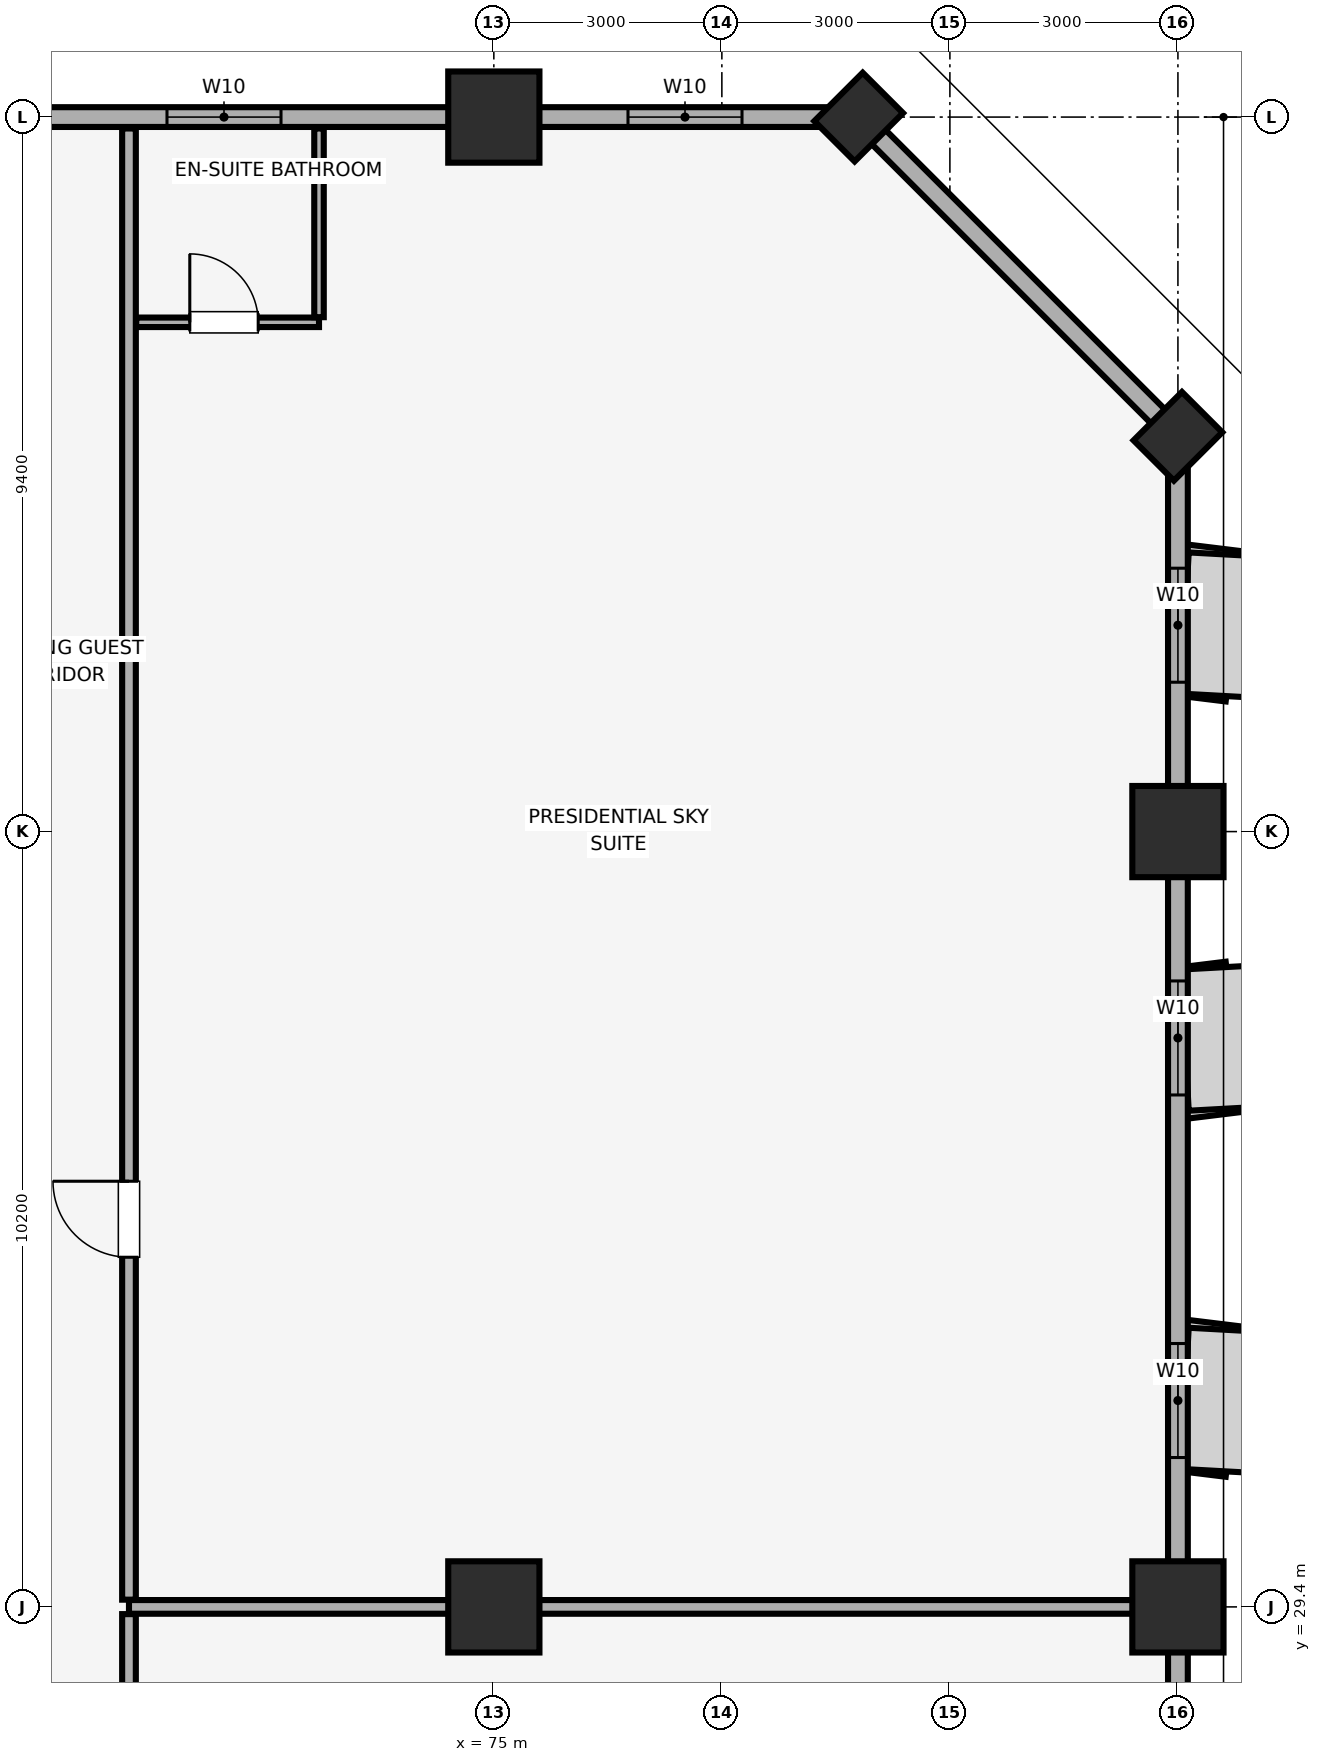
"""IFC4 building model, lengths in metres.
Left out: names, types, materials, properties, quantities, classifications, styles, units other than length and angle.
Written with IfcOpenShell. Run it as: python <this file> out.ifc"""

import sys

from ifc_helpers import new_model, si_unit, direction, frame, frame_2d, origin, origin_2d, place, context, subcontext, project, spatial, rectangle, extrude, element, fill, save


model = new_model("IFC4")
c1 = context("Model", 3, precision=1e-05, world=origin(), true_north=direction((0.0, 1.0)))
c2 = subcontext(c1, "Body", "Model", "MODEL_VIEW")
j1 = project(units=[si_unit("LENGTHUNIT", "METRE"), si_unit("PLANEANGLEUNIT", "RADIAN")], contexts=[c1])
p1 = place(None, origin())
s1 = spatial("IfcSite", under=j1, at=p1, CompositionType="ELEMENT")
p2 = place(p1, origin())
s2 = spatial("IfcBuilding", under=s1, at=p2, CompositionType="ELEMENT")
p3 = place(p2, frame((0.0, 0.0, 93.05)))
s3 = spatial("IfcBuildingStorey", under=s2, at=p3, CompositionType="ELEMENT", Elevation=93.05)
for number, where, z_axis, x_axis in (
    (1, (84.0, 29.4, 0.0), (0.0, 0.0, 1.0), (1.0, 0.0, 0.0)),
    (2, (84.0, 39.6, 0.0), (0.0, 0.0, 1.0), (1.0, 0.0, 0.0)),
):
    element("IfcColumn", number, at=place(p3, frame(where, z_axis=z_axis, x_axis=x_axis)), inside=s3, PredefinedType="COLUMN", context=c2, shape_type="SweptSolid", body=[
        extrude(rectangle(XDim=1.2, YDim=1.2, at=origin_2d()), origin(), (0.0, 0.0, 1.0), 3.51),
    ])
for number, where, z_axis, x_axis in (
    (3, (84.0, 44.8, 0.0), (0.0, 0.0, 1.0), (0.707, 0.707, 0.0)),
    (4, (79.8, 49.0, 0.0), (0.0, 0.0, 1.0), (0.707, 0.707, 0.0)),
):
    element("IfcColumn", number, at=place(p3, frame(where, z_axis=z_axis, x_axis=x_axis)), inside=s3, PredefinedType="PILASTER", context=c2, shape_type="SweptSolid", body=[
        extrude(rectangle(XDim=0.9, YDim=0.75, at=origin_2d()), origin(), (0.0, 0.0, 1.0), 3.51),
    ])
for number, where, z_axis, x_axis in (
    (5, (75.0, 29.4, 0.0), (0.0, 0.0, 1.0), (1.0, 0.0, 0.0)),
    (6, (75.0, 49.0, 0.0), (0.0, 0.0, 1.0), (1.0, 0.0, 0.0)),
):
    element("IfcColumn", number, at=place(p3, frame(where, z_axis=z_axis, x_axis=x_axis)), inside=s3, PredefinedType="COLUMN", context=c2, shape_type="SweptSolid", body=[
        extrude(rectangle(XDim=1.2, YDim=1.2, at=origin_2d()), origin(), (0.0, 0.0, 1.0), 3.51),
    ])
p4 = place(p3, frame((84.0, 4.2, 0.0), z_axis=(0.0, 0.0, 1.0), x_axis=(0.0, 1.0, 0.0)))
e7 = element("IfcWall", 7, at=p4, inside=s3, PredefinedType="SOLIDWALL", context=c2, shape_type="SweptSolid", body=[
    extrude(rectangle(XDim=40.6, YDim=0.26, at=frame_2d((20.3, 0.0))), origin(), (0.0, 0.0, 1.0), 2.56),
])
p5 = place(p4, frame((6.05, 0.0, 0.85)))
e8 = element("IfcOpeningElement", 8, at=p5, cuts=e7, PredefinedType="OPENING", context=c2, shape_type="SweptSolid", body=[
    extrude(rectangle(XDim=1.5, YDim=1.4, at=frame_2d((0.75, 0.7))), frame((0.0, 0.14, 0.0), z_axis=(0.0, -1.0, 0.0), x_axis=(1.0, 0.0, 0.0)), (0.0, 0.0, 1.0), 0.28),
])
p6 = place(p4, frame((13.05, 0.0, 0.85)))
e9 = element("IfcOpeningElement", 9, at=p6, cuts=e7, PredefinedType="OPENING", context=c2, shape_type="SweptSolid", body=[
    extrude(rectangle(XDim=1.5, YDim=1.4, at=frame_2d((0.75, 0.7))), frame((0.0, 0.14, 0.0), z_axis=(0.0, -1.0, 0.0), x_axis=(1.0, 0.0, 0.0)), (0.0, 0.0, 1.0), 0.28),
])
p7 = place(p4, frame((20.775, 0.0, 0.85)))
e10 = element("IfcOpeningElement", 10, at=p7, cuts=e7, PredefinedType="OPENING", context=c2, shape_type="SweptSolid", body=[
    extrude(rectangle(XDim=1.5, YDim=1.4, at=frame_2d((0.75, 0.7))), frame((0.0, 0.14, 0.0), z_axis=(0.0, -1.0, 0.0), x_axis=(1.0, 0.0, 0.0)), (0.0, 0.0, 1.0), 0.28),
])
p8 = place(p4, frame((27.165, 0.0, 0.85)))
e11 = element("IfcOpeningElement", 11, at=p8, cuts=e7, PredefinedType="OPENING", context=c2, shape_type="SweptSolid", body=[
    extrude(rectangle(XDim=1.5, YDim=1.4, at=frame_2d((0.75, 0.7))), frame((0.0, 0.14, 0.0), z_axis=(0.0, -1.0, 0.0), x_axis=(1.0, 0.0, 0.0)), (0.0, 0.0, 1.0), 0.28),
])
p9 = place(p4, frame((31.935, 0.0, 0.85)))
e12 = element("IfcOpeningElement", 12, at=p9, cuts=e7, PredefinedType="OPENING", context=c2, shape_type="SweptSolid", body=[
    extrude(rectangle(XDim=1.5, YDim=1.4, at=frame_2d((0.75, 0.7))), frame((0.0, 0.14, 0.0), z_axis=(0.0, -1.0, 0.0), x_axis=(1.0, 0.0, 0.0)), (0.0, 0.0, 1.0), 0.28),
])
p10 = place(p4, frame((37.365, 0.0, 0.85)))
e13 = element("IfcOpeningElement", 13, at=p10, cuts=e7, PredefinedType="OPENING", context=c2, shape_type="SweptSolid", body=[
    extrude(rectangle(XDim=1.5, YDim=1.4, at=frame_2d((0.75, 0.7))), frame((0.0, 0.14, 0.0), z_axis=(0.0, -1.0, 0.0), x_axis=(1.0, 0.0, 0.0)), (0.0, 0.0, 1.0), 0.28),
])
p11 = place(p3, frame((84.0, 44.8, 0.0), z_axis=(0.0, 0.0, 1.0), x_axis=(-0.707106781187, 0.707106781187, 0.0)))
e14 = element("IfcWall", 14, at=p11, inside=s3, PredefinedType="SOLIDWALL", context=c2, shape_type="SweptSolid", body=[
    extrude(rectangle(XDim=5.94, YDim=0.26, at=frame_2d((2.97, 0.0))), origin(), (0.0, 0.0, 1.0), 2.56),
])
p12 = place(p3, frame((79.8, 49.0, 0.0), z_axis=(0.0, 0.0, 1.0), x_axis=(-1.0, 0.0, 0.0)))
e15 = element("IfcWall", 15, at=p12, inside=s3, PredefinedType="SOLIDWALL", context=c2, shape_type="SweptSolid", body=[
    extrude(rectangle(XDim=75.6, YDim=0.26, at=frame_2d((37.8, 0.0))), origin(), (0.0, 0.0, 1.0), 2.56),
])
p13 = place(p12, frame((72.565, 0.0, 0.85)))
e16 = element("IfcOpeningElement", 16, at=p13, cuts=e15, PredefinedType="OPENING", context=c2, shape_type="SweptSolid", body=[
    extrude(rectangle(XDim=1.5, YDim=1.4, at=frame_2d((0.75, 0.7))), frame((0.0, 0.14, 0.0), z_axis=(0.0, -1.0, 0.0), x_axis=(1.0, 0.0, 0.0)), (0.0, 0.0, 1.0), 0.28),
])
p14 = place(p12, frame((67.45, 0.0, 0.85)))
e17 = element("IfcOpeningElement", 17, at=p14, cuts=e15, PredefinedType="OPENING", context=c2, shape_type="SweptSolid", body=[
    extrude(rectangle(XDim=1.5, YDim=1.4, at=frame_2d((0.75, 0.7))), frame((0.0, 0.14, 0.0), z_axis=(0.0, -1.0, 0.0), x_axis=(1.0, 0.0, 0.0)), (0.0, 0.0, 1.0), 0.28),
])
p15 = place(p12, frame((7.6, 0.0, 0.85)))
e18 = element("IfcOpeningElement", 18, at=p15, cuts=e15, PredefinedType="OPENING", context=c2, shape_type="SweptSolid", body=[
    extrude(rectangle(XDim=1.5, YDim=1.4, at=frame_2d((0.75, 0.7))), frame((0.0, 0.14, 0.0), z_axis=(0.0, -1.0, 0.0), x_axis=(1.0, 0.0, 0.0)), (0.0, 0.0, 1.0), 0.28),
])
p16 = place(p12, frame((1.535, 0.0, 0.85)))
e19 = element("IfcOpeningElement", 19, at=p16, cuts=e15, PredefinedType="OPENING", context=c2, shape_type="SweptSolid", body=[
    extrude(rectangle(XDim=1.5, YDim=1.4, at=frame_2d((0.75, 0.7))), frame((0.0, 0.14, 0.0), z_axis=(0.0, -1.0, 0.0), x_axis=(1.0, 0.0, 0.0)), (0.0, 0.0, 1.0), 0.28),
])
p17 = place(p12, frame((52.265, 0.0, 0.9)))
e20 = element("IfcOpeningElement", 20, at=p17, cuts=e15, PredefinedType="OPENING", context=c2, shape_type="SweptSolid", body=[
    extrude(rectangle(XDim=1.5, YDim=1.4, at=frame_2d((0.75, 0.7))), frame((0.0, 0.14, 0.0), z_axis=(0.0, -1.0, 0.0), x_axis=(1.0, 0.0, 0.0)), (0.0, 0.0, 1.0), 0.28),
])
p18 = place(p12, frame((45.5, 0.0, 0.9)))
e21 = element("IfcOpeningElement", 21, at=p18, cuts=e15, PredefinedType="OPENING", context=c2, shape_type="SweptSolid", body=[
    extrude(rectangle(XDim=1.5, YDim=1.4, at=frame_2d((0.75, 0.7))), frame((0.0, 0.14, 0.0), z_axis=(0.0, -1.0, 0.0), x_axis=(1.0, 0.0, 0.0)), (0.0, 0.0, 1.0), 0.28),
])
p19 = place(p12, frame((31.05, 0.0, 0.9)))
e22 = element("IfcOpeningElement", 22, at=p19, cuts=e15, PredefinedType="OPENING", context=c2, shape_type="SweptSolid", body=[
    extrude(rectangle(XDim=1.5, YDim=1.4, at=frame_2d((0.75, 0.7))), frame((0.0, 0.14, 0.0), z_axis=(0.0, -1.0, 0.0), x_axis=(1.0, 0.0, 0.0)), (0.0, 0.0, 1.0), 0.28),
])
p20 = place(p12, frame((27.85, 0.0, 0.9)))
e23 = element("IfcOpeningElement", 23, at=p20, cuts=e15, PredefinedType="OPENING", context=c2, shape_type="SweptSolid", body=[
    extrude(rectangle(XDim=1.5, YDim=1.4, at=frame_2d((0.75, 0.7))), frame((0.0, 0.14, 0.0), z_axis=(0.0, -1.0, 0.0), x_axis=(1.0, 0.0, 0.0)), (0.0, 0.0, 1.0), 0.28),
])
p21 = place(p12, frame((23.485, 0.0, 0.9)))
e24 = element("IfcOpeningElement", 24, at=p21, cuts=e15, PredefinedType="OPENING", context=c2, shape_type="SweptSolid", body=[
    extrude(rectangle(XDim=1.5, YDim=1.4, at=frame_2d((0.75, 0.7))), frame((0.0, 0.14, 0.0), z_axis=(0.0, -1.0, 0.0), x_axis=(1.0, 0.0, 0.0)), (0.0, 0.0, 1.0), 0.28),
])
p22 = place(p3, frame((70.2, 29.4, 0.0), z_axis=(0.0, 0.0, 1.0), x_axis=(1.0, 0.0, 0.0)))
e25 = element("IfcWall", 25, at=p22, inside=s3, PredefinedType="PARTITIONING", context=c2, shape_type="SweptSolid", body=[
    extrude(rectangle(XDim=13.65, YDim=0.18, at=frame_2d((6.825, 0.0))), origin(), (0.0, 0.0, 1.0), 2.86),
])
p23 = place(p3, frame((70.2, 22.545, 0.0), z_axis=(0.0, 0.0, 1.0), x_axis=(0.0, 1.0, 0.0)))
e26 = element("IfcWall", 26, at=p23, inside=s3, PredefinedType="PARTITIONING", context=c2, shape_type="SweptSolid", body=[
    extrude(rectangle(XDim=6.76, YDim=0.18, at=frame_2d((3.38, 0.0))), origin(), (0.0, 0.0, 1.0), 3.51),
])
p24 = place(p3, frame((70.2, 29.495, 0.0), z_axis=(0.0, 0.0, 1.0), x_axis=(0.0, 1.0, 0.0)))
e27 = element("IfcWall", 27, at=p24, inside=s3, PredefinedType="PARTITIONING", context=c2, shape_type="SweptSolid", body=[
    extrude(rectangle(XDim=19.355, YDim=0.18, at=frame_2d((9.677, 0.0))), origin(), (0.0, 0.0, 1.0), 3.51),
])
p25 = place(p24, frame((4.505, 0.0, 0.0)))
e28 = element("IfcOpeningElement", 28, at=p25, cuts=e27, PredefinedType="OPENING", context=c2, shape_type="SweptSolid", body=[
    extrude(rectangle(XDim=1.0, YDim=2.15, at=frame_2d((0.5, 1.075))), frame((0.0, 0.1, 0.0), z_axis=(0.0, -1.0, 0.0), x_axis=(1.0, 0.0, 0.0)), (0.0, 0.0, 1.0), 0.2),
])
p26 = place(p3, frame((70.295, 46.3, 0.0), z_axis=(0.0, 0.0, 1.0), x_axis=(1.0, 0.0, 0.0)))
e29 = element("IfcWall", 29, at=p26, inside=s3, PredefinedType="PARTITIONING", context=c2, shape_type="SweptSolid", body=[
    extrude(rectangle(XDim=2.405, YDim=0.125, at=frame_2d((1.203, 0.0))), origin(), (0.0, 0.0, 1.0), 3.51),
])
p27 = place(p26, frame((0.705, 0.0, 0.0)))
e30 = element("IfcOpeningElement", 30, at=p27, cuts=e29, PredefinedType="OPENING", context=c2, shape_type="SweptSolid", body=[
    extrude(rectangle(XDim=0.9, YDim=2.1, at=frame_2d((0.45, 1.05))), frame((0.0, 0.073, 0.0), z_axis=(0.0, -1.0, 0.0), x_axis=(1.0, 0.0, 0.0)), (0.0, 0.0, 1.0), 0.145),
])
p28 = place(p3, frame((72.7, 46.367, 0.0), z_axis=(0.0, 0.0, 1.0), x_axis=(0.0, 1.0, 0.0)))
e31 = element("IfcWall", 31, at=p28, inside=s3, PredefinedType="PARTITIONING", context=c2, shape_type="SweptSolid", body=[
    extrude(rectangle(XDim=2.483, YDim=0.125, at=frame_2d((1.241, 0.0))), origin(), (0.0, 0.0, 1.0), 3.51),
])
p29 = place(p8, origin())
e32 = element("IfcWindow", 32, at=p29, inside=s3, PartitioningType="SINGLE_PANEL", PredefinedType="WINDOW", context=c2, shape_type="SweptSolid", body=[
    extrude(rectangle(XDim=1.5, YDim=1.4, at=frame_2d((0.75, 0.7))), frame((0.0, 0.03, 0.0), z_axis=(0.0, -1.0, 0.0), x_axis=(1.0, 0.0, 0.0)), (0.0, 0.0, 1.0), 0.06),
])
fill(e11, e32)
p30 = place(p9, origin())
e33 = element("IfcWindow", 33, at=p30, inside=s3, PartitioningType="SINGLE_PANEL", PredefinedType="WINDOW", context=c2, shape_type="SweptSolid", body=[
    extrude(rectangle(XDim=1.5, YDim=1.4, at=frame_2d((0.75, 0.7))), frame((0.0, 0.03, 0.0), z_axis=(0.0, -1.0, 0.0), x_axis=(1.0, 0.0, 0.0)), (0.0, 0.0, 1.0), 0.06),
])
fill(e12, e33)
p31 = place(p10, origin())
e34 = element("IfcWindow", 34, at=p31, inside=s3, PartitioningType="SINGLE_PANEL", PredefinedType="WINDOW", context=c2, shape_type="SweptSolid", body=[
    extrude(rectangle(XDim=1.5, YDim=1.4, at=frame_2d((0.75, 0.7))), frame((0.0, 0.03, 0.0), z_axis=(0.0, -1.0, 0.0), x_axis=(1.0, 0.0, 0.0)), (0.0, 0.0, 1.0), 0.06),
])
fill(e13, e34)
p32 = place(p15, origin())
e35 = element("IfcWindow", 35, at=p32, inside=s3, PartitioningType="SINGLE_PANEL", PredefinedType="WINDOW", context=c2, shape_type="SweptSolid", body=[
    extrude(rectangle(XDim=1.5, YDim=1.4, at=frame_2d((0.75, 0.7))), frame((0.0, 0.03, 0.0), z_axis=(0.0, -1.0, 0.0), x_axis=(1.0, 0.0, 0.0)), (0.0, 0.0, 1.0), 0.06),
])
fill(e18, e35)
p33 = place(p16, origin())
e36 = element("IfcWindow", 36, at=p33, inside=s3, PartitioningType="SINGLE_PANEL", PredefinedType="WINDOW", context=c2, shape_type="SweptSolid", body=[
    extrude(rectangle(XDim=1.5, YDim=1.4, at=frame_2d((0.75, 0.7))), frame((0.0, 0.03, 0.0), z_axis=(0.0, -1.0, 0.0), x_axis=(1.0, 0.0, 0.0)), (0.0, 0.0, 1.0), 0.06),
])
fill(e19, e36)
p34 = place(p25, origin())
e37 = element("IfcDoor", 37, at=p34, inside=s3, OperationType="SINGLE_SWING_RIGHT", PredefinedType="DOOR", context=c2, shape_type="SweptSolid", body=[
    extrude(rectangle(XDim=1.0, YDim=2.15, at=frame_2d((0.5, 1.075))), frame((0.0, 0.025, 0.0), z_axis=(0.0, -1.0, 0.0), x_axis=(1.0, 0.0, 0.0)), (0.0, 0.0, 1.0), 0.05),
])
fill(e28, e37)
p35 = place(p27, origin())
e38 = element("IfcDoor", 38, at=p35, inside=s3, OperationType="SINGLE_SWING_LEFT", PredefinedType="DOOR", context=c2, shape_type="SweptSolid", body=[
    extrude(rectangle(XDim=0.9, YDim=2.1, at=frame_2d((0.45, 1.05))), frame((0.0, 0.025, 0.0), z_axis=(0.0, -1.0, 0.0), x_axis=(1.0, 0.0, 0.0)), (0.0, 0.0, 1.0), 0.05),
])
fill(e30, e38)
save(model, sys.argv[1])
